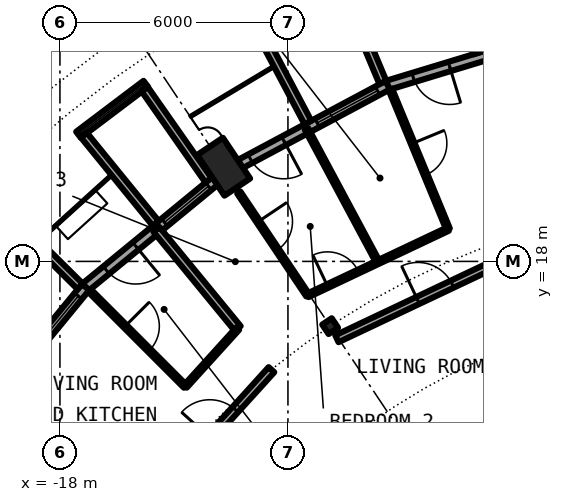
"""IFC4 building model, lengths in metres.
Left out: names, types, materials, properties, quantities, classifications, styles, units other than length and angle.
Written with IfcOpenShell. Run it as: python <this file> out.ifc"""

import sys

from ifc_helpers import new_model, si_unit, direction, frame, frame_2d, origin, origin_2d, place, context, subcontext, project, spatial, rectangle, circle, hollow_circle, i_section, extrude, element, fill, save


model = new_model("IFC4")
c1 = context("Model", 3, precision=1e-05, world=origin(), true_north=direction((0.0, 1.0)))
c2 = subcontext(c1, "Body", "Model", "MODEL_VIEW")
j1 = project(units=[si_unit("LENGTHUNIT", "METRE"), si_unit("PLANEANGLEUNIT", "RADIAN")], contexts=[c1])
p1 = place(None, origin())
s1 = spatial("IfcSite", under=j1, at=p1, CompositionType="ELEMENT")
p2 = place(p1, origin())
s2 = spatial("IfcBuilding", under=s1, at=p2, CompositionType="ELEMENT")
p3 = place(p2, frame((0.0, 0.0, 243.2)))
s3 = spatial("IfcBuildingStorey", under=s2, at=p3, CompositionType="ELEMENT", Elevation=243.2)
p4 = place(p3, frame((-14.05, 21.027, 0.242), z_axis=(0.231750495433, -0.346875102267, 0.908828570905), x_axis=(0.831496228988, 0.555530396269, 0.0)))
e1 = element("IfcColumn", 1, at=p4, inside=s3, PredefinedType="COLUMN", context=c2, shape_type="SweptSolid", body=[
    extrude(hollow_circle(Radius=0.406, WallThickness=0.03, at=origin_2d()), origin(), (0.0, 0.0, 1.0), 3.09),
])
p5 = place(p3, frame((-10.889, 16.297, 0.0), z_axis=(0.0, 0.0, 1.0), x_axis=(-0.55557023302, 0.831469612303, 0.0)))
e2 = element("IfcColumn", 2, at=p5, inside=s3, PredefinedType="COLUMN", context=c2, shape_type="SweptSolid", body=[
    extrude(i_section(OverallWidth=0.3, OverallDepth=0.3, WebThickness=0.011, FlangeThickness=0.019, FilletRadius=0.027, at=origin_2d()), origin(), (0.0, 0.0, 1.0), 3.05),
])
p6 = place(p3, frame((-4.78, 24.029, 0.0), z_axis=(0.0, 0.0, 1.0), x_axis=(-0.956947414517, -0.290261340605, 0.0)))
e3 = element("IfcWall", 3, at=p6, inside=s3, PredefinedType="SOLIDWALL", context=c2, shape_type="SweptSolid", body=[
    extrude(rectangle(XDim=4.803, YDim=0.25, at=frame_2d((2.401, 0.0))), origin(), (0.0, 0.0, 1.0), 2.7),
])
p7 = place(p6, frame((0.62, 0.0, 0.3)))
e4 = element("IfcOpeningElement", 4, at=p7, cuts=e3, PredefinedType="OPENING", context=c2, shape_type="SweptSolid", body=[
    extrude(rectangle(XDim=1.5, YDim=2.1, at=frame_2d((0.75, 1.05))), frame((0.0, 0.135, 0.0), z_axis=(0.0, -1.0, 0.0), x_axis=(1.0, 0.0, 0.0)), (0.0, 0.0, 1.0), 0.27),
])
p8 = place(p6, frame((3.099, 0.0, 0.0)))
e5 = element("IfcOpeningElement", 5, at=p8, cuts=e3, PredefinedType="OPENING", context=c2, shape_type="SweptSolid", body=[
    extrude(rectangle(XDim=1.0, YDim=2.2, at=frame_2d((0.5, 1.1))), frame((0.0, 0.135, 0.0), z_axis=(0.0, -1.0, 0.0), x_axis=(1.0, 0.0, 0.0)), (0.0, 0.0, 1.0), 0.27),
])
p9 = place(p3, frame((-7.029, 23.477, -0.03), z_axis=(0.0, 0.0, 1.0), x_axis=(-0.286681681931, 0.958025893828, 0.0)))
e6 = element("IfcWall", 6, at=p9, inside=s3, PredefinedType="SOLIDWALL", context=c2, shape_type="SweptSolid", body=[
    extrude(rectangle(XDim=2.992, YDim=0.2, at=frame_2d((1.496, 0.0))), origin(), (0.0, 0.0, 1.0), 2.73),
])
p10 = place(p3, frame((-9.376, 22.635, 0.0), z_axis=(0.0, 0.0, 1.0), x_axis=(-0.881903608701, -0.471429766731, 0.0)))
e7 = element("IfcWall", 7, at=p10, inside=s3, PredefinedType="SOLIDWALL", context=c2, shape_type="SweptSolid", body=[
    extrude(rectangle(XDim=4.802, YDim=0.25, at=frame_2d((2.401, 0.0))), origin(), (0.0, 0.0, 1.0), 2.7),
])
p11 = place(p10, frame((0.304, 0.0, 0.3)))
e8 = element("IfcOpeningElement", 8, at=p11, cuts=e7, PredefinedType="OPENING", context=c2, shape_type="SweptSolid", body=[
    extrude(rectangle(XDim=1.8, YDim=2.1, at=frame_2d((0.9, 1.05))), frame((0.0, 0.135, 0.0), z_axis=(0.0, -1.0, 0.0), x_axis=(1.0, 0.0, 0.0)), (0.0, 0.0, 1.0), 0.27),
])
p12 = place(p10, frame((3.099, 0.0, 0.0)))
e9 = element("IfcOpeningElement", 9, at=p12, cuts=e7, PredefinedType="OPENING", context=c2, shape_type="SweptSolid", body=[
    extrude(rectangle(XDim=1.0, YDim=2.2, at=frame_2d((0.5, 1.1))), frame((0.0, 0.135, 0.0), z_axis=(0.0, -1.0, 0.0), x_axis=(1.0, 0.0, 0.0)), (0.0, 0.0, 1.0), 0.27),
])
p13 = place(p3, frame((-9.503, 22.709, -0.03), z_axis=(0.0, 0.0, 1.0), x_axis=(-0.386136412103, 0.922441689891, 0.0)))
e10 = element("IfcWall", 10, at=p13, inside=s3, PredefinedType="SOLIDWALL", context=c2, shape_type="SweptSolid", body=[
    extrude(rectangle(XDim=2.883, YDim=0.2, at=frame_2d((1.441, 0.0))), origin(), (0.0, 0.0, 1.0), 2.73),
])
p14 = place(p3, frame((-11.475, 21.655, -0.03), z_axis=(0.0, 0.0, 1.0), x_axis=(-0.467917715158, 0.883772036128, 0.0)))
e11 = element("IfcWall", 11, at=p14, inside=s3, PredefinedType="SOLIDWALL", context=c2, shape_type="SweptSolid", body=[
    extrude(rectangle(XDim=2.992, YDim=0.2, at=frame_2d((1.496, 0.0))), origin(), (0.0, 0.0, 1.0), 2.73),
])
p15 = place(p3, frame((-13.611, 20.371, 0.0), z_axis=(0.0, 0.0, 1.0), x_axis=(-0.773007538262, -0.634396836208, 0.0)))
e12 = element("IfcWall", 12, at=p15, inside=s3, PredefinedType="SOLIDWALL", context=c2, shape_type="SweptSolid", body=[
    extrude(rectangle(XDim=4.803, YDim=0.25, at=frame_2d((2.402, 0.0))), origin(), (0.0, 0.0, 1.0), 2.7),
])
p16 = place(p15, frame((0.62, 0.0, 0.3)))
e13 = element("IfcOpeningElement", 13, at=p16, cuts=e12, PredefinedType="OPENING", context=c2, shape_type="SweptSolid", body=[
    extrude(rectangle(XDim=1.5, YDim=2.1, at=frame_2d((0.75, 1.05))), frame((0.0, 0.135, 0.0), z_axis=(0.0, -1.0, 0.0), x_axis=(1.0, 0.0, 0.0)), (0.0, 0.0, 1.0), 0.27),
])
p17 = place(p15, frame((3.099, 0.0, 0.0)))
e14 = element("IfcOpeningElement", 14, at=p17, cuts=e12, PredefinedType="OPENING", context=c2, shape_type="SweptSolid", body=[
    extrude(rectangle(XDim=1.0, YDim=2.2, at=frame_2d((0.5, 1.1))), frame((0.0, 0.135, 0.0), z_axis=(0.0, -1.0, 0.0), x_axis=(1.0, 0.0, 0.0)), (0.0, 0.0, 1.0), 0.27),
])
p18 = place(p3, frame((-15.74, 22.672, -0.03), z_axis=(0.0, 0.0, 1.0), x_axis=(-0.797805050803, -0.602915500641, 0.0)))
e15 = element("IfcWall", 15, at=p18, inside=s3, PredefinedType="SOLIDWALL", context=c2, shape_type="SweptSolid", body=[
    extrude(rectangle(XDim=2.221, YDim=0.2, at=frame_2d((1.11, 0.0))), origin(), (0.0, 0.0, 1.0), 2.73),
])
p19 = place(p18, frame((0.071, 0.0, 0.33)))
e16 = element("IfcOpeningElement", 16, at=p19, cuts=e15, PredefinedType="OPENING", context=c2, shape_type="SweptSolid", body=[
    extrude(circle(Radius=1.04, at=frame_2d((1.04, 1.04))), frame((0.0, 0.11, 0.0), z_axis=(0.0, -1.0, 0.0), x_axis=(1.0, 0.0, 0.0)), (0.0, 0.0, 1.0), 0.22),
])
p20 = place(p3, frame((-14.093, 20.138, -0.03), z_axis=(0.0, 0.0, 1.0), x_axis=(-0.573596998419, 0.81913764619, 0.0)))
e17 = element("IfcWall", 17, at=p20, inside=s3, PredefinedType="SOLIDWALL", context=c2, shape_type="SweptSolid", body=[
    extrude(rectangle(XDim=2.92, YDim=0.2, at=frame_2d((1.46, 0.0))), origin(), (0.0, 0.0, 1.0), 2.73),
])
p21 = place(p3, frame((-15.479, 19.0, -0.03), z_axis=(0.0, 0.0, 1.0), x_axis=(-0.631209771017, 0.775612161439, 0.0)))
e18 = element("IfcWall", 18, at=p21, inside=s3, PredefinedType="SOLIDWALL", context=c2, shape_type="SweptSolid", body=[
    extrude(rectangle(XDim=2.992, YDim=0.2, at=frame_2d((1.496, 0.0))), origin(), (0.0, 0.0, 1.0), 2.73),
])
p22 = place(p3, frame((-17.324, 17.324, 0.0), z_axis=(0.0, 0.0, 1.0), x_axis=(-0.634396836208, -0.773007538262, 0.0)))
e19 = element("IfcWall", 19, at=p22, inside=s3, PredefinedType="SOLIDWALL", context=c2, shape_type="SweptSolid", body=[
    extrude(rectangle(XDim=4.803, YDim=0.25, at=frame_2d((2.402, 0.0))), origin(), (0.0, 0.0, 1.0), 2.7),
])
p23 = place(p22, frame((0.304, 0.0, 0.3)))
e20 = element("IfcOpeningElement", 20, at=p23, cuts=e19, PredefinedType="OPENING", context=c2, shape_type="SweptSolid", body=[
    extrude(rectangle(XDim=1.8, YDim=2.1, at=frame_2d((0.9, 1.05))), frame((0.0, 0.135, 0.0), z_axis=(0.0, -1.0, 0.0), x_axis=(1.0, 0.0, 0.0)), (0.0, 0.0, 1.0), 0.27),
])
p24 = place(p22, frame((3.099, 0.0, 0.0)))
e21 = element("IfcOpeningElement", 21, at=p24, cuts=e19, PredefinedType="OPENING", context=c2, shape_type="SweptSolid", body=[
    extrude(rectangle(XDim=1.0, YDim=2.2, at=frame_2d((0.5, 1.1))), frame((0.0, 0.135, 0.0), z_axis=(0.0, -1.0, 0.0), x_axis=(1.0, 0.0, 0.0)), (0.0, 0.0, 1.0), 0.27),
])
p25 = place(p3, frame((-17.47, 17.344, -0.03), z_axis=(0.0, 0.0, 1.0), x_axis=(-0.709896457854, 0.704306055012, 0.0)))
e22 = element("IfcWall", 22, at=p25, inside=s3, PredefinedType="SOLIDWALL", context=c2, shape_type="SweptSolid", body=[
    extrude(rectangle(XDim=2.882, YDim=0.2, at=frame_2d((1.441, 0.0))), origin(), (0.0, 0.0, 1.0), 2.73),
])
p26 = place(p3, frame((-17.23, 17.241, 0.0), z_axis=(0.0, 0.0, 1.0), x_axis=(0.706833687935, -0.707379769007, 0.0)))
e23 = element("IfcWall", 23, at=p26, inside=s3, PredefinedType="PARTITIONING", context=c2, shape_type="SweptSolid", body=[
    extrude(rectangle(XDim=3.577, YDim=0.1, at=frame_2d((1.788, 0.0))), origin(), (0.0, 0.0, 1.0), 2.7),
])
p27 = place(p26, frame((1.338, 0.0, 0.0)))
e24 = element("IfcOpeningElement", 24, at=p27, cuts=e23, PredefinedType="OPENING", context=c2, shape_type="SweptSolid", body=[
    extrude(rectangle(XDim=0.9, YDim=2.3, at=frame_2d((0.45, 1.15))), frame((0.0, 0.06, 0.0), z_axis=(0.0, -1.0, 0.0), x_axis=(1.0, 0.0, 0.0)), (0.0, 0.0, 1.0), 0.12),
])
p28 = place(p3, frame((-15.462, 18.843, 0.0), z_axis=(0.0, 0.0, 1.0), x_axis=(0.63432437119, -0.773067003638, 0.0)))
e25 = element("IfcWall", 25, at=p28, inside=s3, PredefinedType="PARTITIONING", context=c2, shape_type="SweptSolid", body=[
    extrude(rectangle(XDim=3.375, YDim=0.2, at=frame_2d((1.688, 0.0))), origin(), (0.0, 0.0, 1.0), 2.7),
])
p29 = place(p3, frame((-13.294, 19.813, 0.0), z_axis=(0.0, 0.0, 1.0), x_axis=(0.557289656456, -0.830318155171, 0.0)))
e26 = element("IfcWall", 26, at=p29, inside=s3, PredefinedType="PARTITIONING", context=c2, shape_type="SweptSolid", body=[
    extrude(rectangle(XDim=3.26, YDim=0.1, at=frame_2d((1.63, 0.0))), origin(), (0.0, 0.0, 1.0), 2.7),
])
p30 = place(p29, frame((0.922, 0.0, 0.0)))
e27 = element("IfcOpeningElement", 27, at=p30, cuts=e26, PredefinedType="OPENING", context=c2, shape_type="SweptSolid", body=[
    extrude(rectangle(XDim=0.9, YDim=2.3, at=frame_2d((0.45, 1.15))), frame((0.0, 0.06, 0.0), z_axis=(0.0, -1.0, 0.0), x_axis=(1.0, 0.0, 0.0)), (0.0, 0.0, 1.0), 0.12),
])
p31 = place(p3, frame((-11.511, 21.486, 0.0), z_axis=(0.0, 0.0, 1.0), x_axis=(0.472243548981, -0.88146811085, 0.0)))
e28 = element("IfcWall", 28, at=p31, inside=s3, PredefinedType="PARTITIONING", context=c2, shape_type="SweptSolid", body=[
    extrude(rectangle(XDim=3.979, YDim=0.1, at=frame_2d((1.989, 0.0))), origin(), (0.0, 0.0, 1.0), 2.7),
])
p32 = place(p3, frame((-9.306, 22.529, 0.0), z_axis=(0.0, 0.0, 1.0), x_axis=(0.381681535062, -0.924293895789, 0.0)))
e29 = element("IfcWall", 29, at=p32, inside=s3, PredefinedType="PARTITIONING", context=c2, shape_type="SweptSolid", body=[
    extrude(rectangle(XDim=3.979, YDim=0.1, at=frame_2d((1.99, 0.0))), origin(), (0.0, 0.0, 1.0), 2.7),
])
p33 = place(p32, frame((1.54, 0.0, 0.0)))
e30 = element("IfcOpeningElement", 30, at=p33, cuts=e29, PredefinedType="OPENING", context=c2, shape_type="SweptSolid", body=[
    extrude(rectangle(XDim=0.9, YDim=2.3, at=frame_2d((0.45, 1.15))), frame((0.0, 0.06, 0.0), z_axis=(0.0, -1.0, 0.0), x_axis=(1.0, 0.0, 0.0)), (0.0, 0.0, 1.0), 0.12),
])
p34 = place(p3, frame((-10.228, 10.175, 0.0), z_axis=(0.0, 0.0, 1.0), x_axis=(0.772989261861, 0.634419105204, 0.0)))
e31 = element("IfcWall", 31, at=p34, inside=s3, PredefinedType="PARTITIONING", context=c2, shape_type="SweptSolid", body=[
    extrude(rectangle(XDim=5.803, YDim=0.2, at=frame_2d((2.902, 0.0))), origin(), (0.0, 0.0, 1.0), 2.7),
])
p35 = place(p34, frame((0.952, 0.0, 0.0)))
e32 = element("IfcOpeningElement", 32, at=p35, cuts=e31, PredefinedType="OPENING", context=c2, shape_type="SweptSolid", body=[
    extrude(rectangle(XDim=1.0, YDim=2.3, at=frame_2d((0.5, 1.15))), frame((0.0, 0.11, 0.0), z_axis=(0.0, -1.0, 0.0), x_axis=(1.0, 0.0, 0.0)), (0.0, 0.0, 1.0), 0.22),
])
p36 = place(p3, frame((-10.712, 15.965, 0.0), z_axis=(0.0, 0.0, 1.0), x_axis=(0.903916894048, 0.427708134895, 0.0)))
e33 = element("IfcWall", 33, at=p36, inside=s3, PredefinedType="PARTITIONING", context=c2, shape_type="SweptSolid", body=[
    extrude(rectangle(XDim=7.465, YDim=0.2, at=frame_2d((3.732, 0.0))), origin(), (0.0, 0.0, 1.0), 2.45),
])
p37 = place(p36, frame((2.357, 0.0, 0.0)))
e34 = element("IfcOpeningElement", 34, at=p37, cuts=e33, PredefinedType="OPENING", context=c2, shape_type="SweptSolid", body=[
    extrude(rectangle(XDim=1.0, YDim=2.3, at=frame_2d((0.5, 1.15))), frame((0.0, 0.11, 0.0), z_axis=(0.0, -1.0, 0.0), x_axis=(1.0, 0.0, 0.0)), (0.0, 0.0, 1.0), 0.22),
])
p38 = place(p3, frame((-16.195, 11.002, 0.0), z_axis=(0.0, 0.0, 1.0), x_axis=(0.671619657805, 0.740896102871, 0.0)))
e35 = element("IfcWall", 35, at=p38, inside=s3, PredefinedType="PARTITIONING", context=c2, shape_type="SweptSolid", body=[
    extrude(rectangle(XDim=5.6, YDim=0.2, at=frame_2d((2.8, 0.0))), origin(), (0.0, 0.0, 1.0), 2.45),
])
p39 = place(p38, frame((3.183, 0.0, 0.0)))
e36 = element("IfcOpeningElement", 36, at=p39, cuts=e35, PredefinedType="OPENING", context=c2, shape_type="SweptSolid", body=[
    extrude(rectangle(XDim=1.0, YDim=2.3, at=frame_2d((0.5, 1.15))), frame((0.0, 0.11, 0.0), z_axis=(0.0, -1.0, 0.0), x_axis=(1.0, 0.0, 0.0)), (0.0, 0.0, 1.0), 0.22),
])
p40 = place(p3, frame((-11.477, 17.106, 0.0), z_axis=(0.0, 0.0, 1.0), x_axis=(0.903998300084, 0.427536049292, 0.0)))
e37 = element("IfcWall", 37, at=p40, inside=s3, PredefinedType="PARTITIONING", context=c2, shape_type="SweptSolid", body=[
    extrude(rectangle(XDim=4.082, YDim=0.1, at=frame_2d((2.041, 0.0))), origin(), (0.0, 0.0, 1.0), 2.7),
])
p41 = place(p40, frame((0.573, 0.0, 0.0)))
e38 = element("IfcOpeningElement", 38, at=p41, cuts=e37, PredefinedType="OPENING", context=c2, shape_type="SweptSolid", body=[
    extrude(rectangle(XDim=0.9, YDim=2.3, at=frame_2d((0.45, 1.15))), frame((0.0, 0.06, 0.0), z_axis=(0.0, -1.0, 0.0), x_axis=(1.0, 0.0, 0.0)), (0.0, 0.0, 1.0), 0.12),
])
p42 = place(p3, frame((-14.701, 14.711, 0.0), z_axis=(0.0, 0.0, 1.0), x_axis=(0.671678456097, 0.74084279818, 0.0)))
e39 = element("IfcWall", 39, at=p42, inside=s3, PredefinedType="PARTITIONING", context=c2, shape_type="SweptSolid", body=[
    extrude(rectangle(XDim=2.054, YDim=0.1, at=frame_2d((1.027, 0.0))), origin(), (0.0, 0.0, 1.0), 2.7),
])
p43 = place(p8, origin())
e40 = element("IfcDoor", 40, at=p43, inside=s3, OperationType="SINGLE_SWING_LEFT", PredefinedType="DOOR", context=c2, shape_type="SweptSolid", body=[
    extrude(rectangle(XDim=1.0, YDim=2.2, at=frame_2d((0.5, 1.1))), frame((0.0, 0.025, 0.0), z_axis=(0.0, -1.0, 0.0), x_axis=(1.0, 0.0, 0.0)), (0.0, 0.0, 1.0), 0.05),
])
fill(e5, e40)
p44 = place(p11, origin())
e41 = element("IfcWindow", 41, at=p44, inside=s3, PartitioningType="SINGLE_PANEL", PredefinedType="WINDOW", context=c2, shape_type="SweptSolid", body=[
    extrude(rectangle(XDim=1.8, YDim=2.1, at=frame_2d((0.9, 1.05))), frame((0.0, 0.03, 0.0), z_axis=(0.0, -1.0, 0.0), x_axis=(1.0, 0.0, 0.0)), (0.0, 0.0, 1.0), 0.06),
])
fill(e8, e41)
p45 = place(p12, origin())
e42 = element("IfcDoor", 42, at=p45, inside=s3, OperationType="SINGLE_SWING_LEFT", PredefinedType="DOOR", context=c2, shape_type="SweptSolid", body=[
    extrude(rectangle(XDim=1.0, YDim=2.2, at=frame_2d((0.5, 1.1))), frame((0.0, 0.025, 0.0), z_axis=(0.0, -1.0, 0.0), x_axis=(1.0, 0.0, 0.0)), (0.0, 0.0, 1.0), 0.05),
])
fill(e9, e42)
p46 = place(p16, origin())
e43 = element("IfcWindow", 43, at=p46, inside=s3, PartitioningType="SINGLE_PANEL", PredefinedType="WINDOW", context=c2, shape_type="SweptSolid", body=[
    extrude(rectangle(XDim=1.5, YDim=2.1, at=frame_2d((0.75, 1.05))), frame((0.0, 0.03, 0.0), z_axis=(0.0, -1.0, 0.0), x_axis=(1.0, 0.0, 0.0)), (0.0, 0.0, 1.0), 0.06),
])
fill(e13, e43)
p47 = place(p19, origin())
e44 = element("IfcWindow", 44, at=p47, inside=s3, PartitioningType="SINGLE_PANEL", PredefinedType="WINDOW", context=c2, shape_type="SweptSolid", body=[
    extrude(circle(Radius=1.04, at=frame_2d((1.04, 1.04))), frame((0.0, 0.03, 0.0), z_axis=(0.0, -1.0, 0.0), x_axis=(1.0, 0.0, 0.0)), (0.0, 0.0, 1.0), 0.06),
])
fill(e16, e44)
p48 = place(p17, origin())
e45 = element("IfcDoor", 45, at=p48, inside=s3, OperationType="SINGLE_SWING_LEFT", PredefinedType="DOOR", context=c2, shape_type="SweptSolid", body=[
    extrude(rectangle(XDim=1.0, YDim=2.2, at=frame_2d((0.5, 1.1))), frame((0.0, 0.025, 0.0), z_axis=(0.0, -1.0, 0.0), x_axis=(1.0, 0.0, 0.0)), (0.0, 0.0, 1.0), 0.05),
])
fill(e14, e45)
p49 = place(p23, origin())
e46 = element("IfcWindow", 46, at=p49, inside=s3, PartitioningType="SINGLE_PANEL", PredefinedType="WINDOW", context=c2, shape_type="SweptSolid", body=[
    extrude(rectangle(XDim=1.8, YDim=2.1, at=frame_2d((0.9, 1.05))), frame((0.0, 0.03, 0.0), z_axis=(0.0, -1.0, 0.0), x_axis=(1.0, 0.0, 0.0)), (0.0, 0.0, 1.0), 0.06),
])
fill(e20, e46)
p50 = place(p37, origin())
e47 = element("IfcDoor", 47, at=p50, inside=s3, OperationType="SINGLE_SWING_LEFT", PredefinedType="DOOR", context=c2, shape_type="SweptSolid", body=[
    extrude(rectangle(XDim=1.0, YDim=2.3, at=frame_2d((0.5, 1.15))), frame((0.0, 0.025, 0.0), z_axis=(0.0, -1.0, 0.0), x_axis=(1.0, 0.0, 0.0)), (0.0, 0.0, 1.0), 0.05),
])
fill(e34, e47)
p51 = place(p33, origin())
e48 = element("IfcDoor", 48, at=p51, inside=s3, OperationType="SINGLE_SWING_LEFT", PredefinedType="DOOR", context=c2, shape_type="SweptSolid", body=[
    extrude(rectangle(XDim=0.9, YDim=2.3, at=frame_2d((0.45, 1.15))), frame((0.0, 0.025, 0.0), z_axis=(0.0, -1.0, 0.0), x_axis=(1.0, 0.0, 0.0)), (0.0, 0.0, 1.0), 0.05),
])
fill(e30, e48)
p52 = place(p41, origin())
e49 = element("IfcDoor", 49, at=p52, inside=s3, OperationType="SINGLE_SWING_LEFT", PredefinedType="DOOR", context=c2, shape_type="SweptSolid", body=[
    extrude(rectangle(XDim=0.9, YDim=2.3, at=frame_2d((0.45, 1.15))), frame((0.0, 0.025, 0.0), z_axis=(0.0, -1.0, 0.0), x_axis=(1.0, 0.0, 0.0)), (0.0, 0.0, 1.0), 0.05),
])
fill(e38, e49)
p53 = place(p30, origin())
e50 = element("IfcDoor", 50, at=p53, inside=s3, OperationType="SINGLE_SWING_LEFT", PredefinedType="DOOR", context=c2, shape_type="SweptSolid", body=[
    extrude(rectangle(XDim=0.9, YDim=2.3, at=frame_2d((0.45, 1.15))), frame((0.0, 0.025, 0.0), z_axis=(0.0, -1.0, 0.0), x_axis=(1.0, 0.0, 0.0)), (0.0, 0.0, 1.0), 0.05),
])
fill(e27, e50)
p54 = place(p39, origin())
e51 = element("IfcDoor", 51, at=p54, inside=s3, OperationType="SINGLE_SWING_RIGHT", PredefinedType="DOOR", context=c2, shape_type="SweptSolid", body=[
    extrude(rectangle(XDim=1.0, YDim=2.3, at=frame_2d((0.5, 1.15))), frame((0.0, 0.025, 0.0), z_axis=(0.0, -1.0, 0.0), x_axis=(1.0, 0.0, 0.0)), (0.0, 0.0, 1.0), 0.05),
])
fill(e36, e51)
p55 = place(p27, origin())
e52 = element("IfcDoor", 52, at=p55, inside=s3, OperationType="SINGLE_SWING_LEFT", PredefinedType="DOOR", context=c2, shape_type="SweptSolid", body=[
    extrude(rectangle(XDim=0.9, YDim=2.3, at=frame_2d((0.45, 1.15))), frame((0.0, 0.025, 0.0), z_axis=(0.0, -1.0, 0.0), x_axis=(1.0, 0.0, 0.0)), (0.0, 0.0, 1.0), 0.05),
])
fill(e24, e52)
save(model, sys.argv[1])
